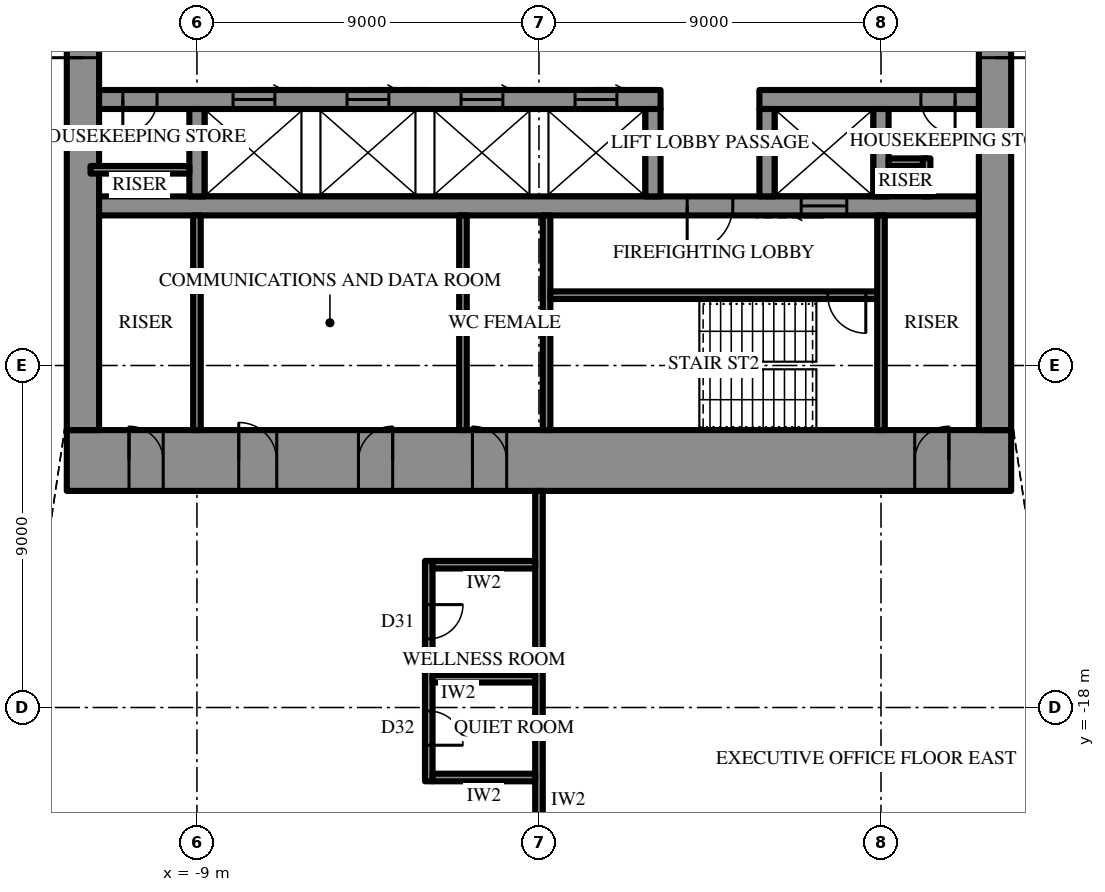
"""IFC4 building model, lengths in metres.
Left out: names, types, materials, properties, quantities, classifications, styles, units other than length and angle.
Written with IfcOpenShell. Run it as: python <this file> out.ifc"""

import sys

from ifc_helpers import new_model, si_unit, direction, frame, frame_2d, origin, place, context, subcontext, project, spatial, rectangle, extrude, element, fill, save


model = new_model("IFC4")
c1 = context("Model", 3, precision=1e-05, world=origin(), true_north=direction((0.0, 1.0)))
c2 = subcontext(c1, "Body", "Model", "MODEL_VIEW")
j1 = project(units=[si_unit("LENGTHUNIT", "METRE"), si_unit("PLANEANGLEUNIT", "RADIAN")], contexts=[c1])
p1 = place(None, origin())
s1 = spatial("IfcSite", under=j1, at=p1, CompositionType="ELEMENT")
p2 = place(p1, origin())
s2 = spatial("IfcBuilding", under=s1, at=p2, CompositionType="ELEMENT")
p3 = place(p2, frame((0.0, 0.0, 370.3)))
s3 = spatial("IfcBuildingStorey", under=s2, at=p3, CompositionType="ELEMENT", Elevation=370.3)
p4 = place(p3, frame((12.425, -11.5, 0.0), z_axis=(0.0, 0.0, 1.0), x_axis=(-1.0, 0.0, 0.0)))
e1 = element("IfcWall", 1, at=p4, inside=s3, PredefinedType="SHEAR", context=c2, shape_type="SweptSolid", body=[
    extrude(rectangle(XDim=24.85, YDim=1.6, at=frame_2d((12.425, 0.0))), origin(), (0.0, 0.0, 1.0), 4.2),
])
p5 = place(p4, frame((13.275, 0.0, 0.0)))
e2 = element("IfcOpeningElement", 2, at=p5, cuts=e1, PredefinedType="OPENING", context=c2, shape_type="SweptSolid", body=[
    extrude(rectangle(XDim=0.9, YDim=2.2, at=frame_2d((0.45, 1.1))), frame((0.0, 0.81, 0.0), z_axis=(0.0, -1.0, 0.0), x_axis=(1.0, 0.0, 0.0)), (0.0, 0.0, 1.0), 1.62),
])
p6 = place(p4, frame((16.275, 0.0, 0.0)))
e3 = element("IfcOpeningElement", 3, at=p6, cuts=e1, PredefinedType="OPENING", context=c2, shape_type="SweptSolid", body=[
    extrude(rectangle(XDim=0.9, YDim=2.2, at=frame_2d((0.45, 1.1))), frame((0.0, 0.81, 0.0), z_axis=(0.0, -1.0, 0.0), x_axis=(1.0, 0.0, 0.0)), (0.0, 0.0, 1.0), 1.62),
])
p7 = place(p4, frame((19.325, 0.0, 0.0)))
e4 = element("IfcOpeningElement", 4, at=p7, cuts=e1, PredefinedType="OPENING", context=c2, shape_type="SweptSolid", body=[
    extrude(rectangle(XDim=1.0, YDim=2.2, at=frame_2d((0.5, 1.1))), frame((0.0, 0.81, 0.0), z_axis=(0.0, -1.0, 0.0), x_axis=(1.0, 0.0, 0.0)), (0.0, 0.0, 1.0), 1.62),
])
p8 = place(p4, frame((1.637, 0.0, 0.0)))
e5 = element("IfcOpeningElement", 5, at=p8, cuts=e1, PredefinedType="OPENING", context=c2, shape_type="SweptSolid", body=[
    extrude(rectangle(XDim=0.9, YDim=2.2, at=frame_2d((0.45, 1.1))), frame((0.0, 0.81, 0.0), z_axis=(0.0, -1.0, 0.0), x_axis=(1.0, 0.0, 0.0)), (0.0, 0.0, 1.0), 1.62),
])
p9 = place(p4, frame((22.312, 0.0, 0.0)))
e6 = element("IfcOpeningElement", 6, at=p9, cuts=e1, PredefinedType="OPENING", context=c2, shape_type="SweptSolid", body=[
    extrude(rectangle(XDim=0.9, YDim=2.2, at=frame_2d((0.45, 1.1))), frame((0.0, 0.81, 0.0), z_axis=(0.0, -1.0, 0.0), x_axis=(1.0, 0.0, 0.0)), (0.0, 0.0, 1.0), 1.62),
])
p10 = place(p3, frame((12.0, -10.7, 0.0), z_axis=(0.0, 0.0, 1.0), x_axis=(0.0, 1.0, 0.0)))
e7 = element("IfcWall", 7, at=p10, inside=s3, PredefinedType="SHEAR", context=c2, shape_type="SweptSolid", body=[
    extrude(rectangle(XDim=21.4, YDim=0.85, at=frame_2d((10.7, 0.0))), origin(), (0.0, 0.0, 1.0), 4.2),
])
p11 = place(p10, frame((9.8, 0.0, 0.0)))
e8 = element("IfcOpeningElement", 8, at=p11, cuts=e7, PredefinedType="OPENING", context=c2, shape_type="SweptSolid", body=[
    extrude(rectangle(XDim=1.8, YDim=2.4, at=frame_2d((0.9, 1.2))), frame((0.0, 0.435, 0.0), z_axis=(0.0, -1.0, 0.0), x_axis=(1.0, 0.0, 0.0)), (0.0, 0.0, 1.0), 0.87),
])
p12 = place(p3, frame((-12.0, 10.7, 0.0), z_axis=(0.0, 0.0, 1.0), x_axis=(0.0, -1.0, 0.0)))
e9 = element("IfcWall", 9, at=p12, inside=s3, PredefinedType="SHEAR", context=c2, shape_type="SweptSolid", body=[
    extrude(rectangle(XDim=21.4, YDim=0.85, at=frame_2d((10.7, 0.0))), origin(), (0.0, 0.0, 1.0), 4.2),
])
p13 = place(p12, frame((9.8, 0.0, 0.0)))
e10 = element("IfcOpeningElement", 10, at=p13, cuts=e9, PredefinedType="OPENING", context=c2, shape_type="SweptSolid", body=[
    extrude(rectangle(XDim=1.8, YDim=2.4, at=frame_2d((0.9, 1.2))), frame((0.0, 0.435, 0.0), z_axis=(0.0, -1.0, 0.0), x_axis=(1.0, 0.0, 0.0)), (0.0, 0.0, 1.0), 0.87),
])
p14 = place(p3, frame((11.575, -2.0, 0.0), z_axis=(0.0, 0.0, 1.0), x_axis=(-1.0, 0.0, 0.0)))
e11 = element("IfcWall", 11, at=p14, inside=s3, PredefinedType="SHEAR", context=c2, shape_type="SweptSolid", body=[
    extrude(rectangle(XDim=5.775, YDim=0.5, at=frame_2d((2.887, 0.0))), origin(), (0.0, 0.0, 1.0), 4.2),
])
p15 = place(p14, frame((0.625, 0.0, 0.0)))
e12 = element("IfcOpeningElement", 12, at=p15, cuts=e11, PredefinedType="OPENING", context=c2, shape_type="SweptSolid", body=[
    extrude(rectangle(XDim=0.9, YDim=2.2, at=frame_2d((0.45, 1.1))), frame((0.0, 0.26, 0.0), z_axis=(0.0, -1.0, 0.0), x_axis=(1.0, 0.0, 0.0)), (0.0, 0.0, 1.0), 0.52),
])
p16 = place(p3, frame((3.2, -2.0, 0.0), z_axis=(0.0, 0.0, 1.0), x_axis=(-1.0, 0.0, 0.0)))
e13 = element("IfcWall", 13, at=p16, inside=s3, PredefinedType="SHEAR", context=c2, shape_type="SweptSolid", body=[
    extrude(rectangle(XDim=14.775, YDim=0.5, at=frame_2d((7.387, 0.0))), origin(), (0.0, 0.0, 1.0), 4.2),
])
p17 = place(p16, frame((13.25, 0.0, 0.0)))
e14 = element("IfcOpeningElement", 14, at=p17, cuts=e13, PredefinedType="OPENING", context=c2, shape_type="SweptSolid", body=[
    extrude(rectangle(XDim=0.9, YDim=2.2, at=frame_2d((0.45, 1.1))), frame((0.0, 0.26, 0.0), z_axis=(0.0, -1.0, 0.0), x_axis=(1.0, 0.0, 0.0)), (0.0, 0.0, 1.0), 0.52),
])
p18 = place(p16, frame((1.15, 0.0, 0.0)))
e15 = element("IfcOpeningElement", 15, at=p18, cuts=e13, PredefinedType="OPENING", context=c2, shape_type="SweptSolid", body=[
    extrude(rectangle(XDim=1.1, YDim=2.2, at=frame_2d((0.55, 1.1))), frame((0.0, 0.26, 0.0), z_axis=(0.0, -1.0, 0.0), x_axis=(1.0, 0.0, 0.0)), (0.0, 0.0, 1.0), 0.52),
])
p19 = place(p16, frame((4.15, 0.0, 0.0)))
e16 = element("IfcOpeningElement", 16, at=p19, cuts=e13, PredefinedType="OPENING", context=c2, shape_type="SweptSolid", body=[
    extrude(rectangle(XDim=1.1, YDim=2.2, at=frame_2d((0.55, 1.1))), frame((0.0, 0.26, 0.0), z_axis=(0.0, -1.0, 0.0), x_axis=(1.0, 0.0, 0.0)), (0.0, 0.0, 1.0), 0.52),
])
p20 = place(p16, frame((7.15, 0.0, 0.0)))
e17 = element("IfcOpeningElement", 17, at=p20, cuts=e13, PredefinedType="OPENING", context=c2, shape_type="SweptSolid", body=[
    extrude(rectangle(XDim=1.1, YDim=2.2, at=frame_2d((0.55, 1.1))), frame((0.0, 0.26, 0.0), z_axis=(0.0, -1.0, 0.0), x_axis=(1.0, 0.0, 0.0)), (0.0, 0.0, 1.0), 0.52),
])
p21 = place(p16, frame((10.15, 0.0, 0.0)))
e18 = element("IfcOpeningElement", 18, at=p21, cuts=e13, PredefinedType="OPENING", context=c2, shape_type="SweptSolid", body=[
    extrude(rectangle(XDim=1.1, YDim=2.2, at=frame_2d((0.55, 1.1))), frame((0.0, 0.26, 0.0), z_axis=(0.0, -1.0, 0.0), x_axis=(1.0, 0.0, 0.0)), (0.0, 0.0, 1.0), 0.52),
])
p22 = place(p3, frame((11.575, -4.8, 0.0), z_axis=(0.0, 0.0, 1.0), x_axis=(-1.0, 0.0, 0.0)))
e19 = element("IfcWall", 19, at=p22, inside=s3, PredefinedType="SHEAR", context=c2, shape_type="SweptSolid", body=[
    extrude(rectangle(XDim=23.15, YDim=0.5, at=frame_2d((11.575, 0.0))), origin(), (0.0, 0.0, 1.0), 4.2),
])
p23 = place(p22, frame((6.475, 0.0, 0.0)))
e20 = element("IfcOpeningElement", 20, at=p23, cuts=e19, PredefinedType="OPENING", context=c2, shape_type="SweptSolid", body=[
    extrude(rectangle(XDim=1.2, YDim=2.2, at=frame_2d((0.6, 1.1))), frame((0.0, 0.26, 0.0), z_axis=(0.0, -1.0, 0.0), x_axis=(1.0, 0.0, 0.0)), (0.0, 0.0, 1.0), 0.52),
])
p24 = place(p22, frame((3.475, 0.0, 0.0)))
e21 = element("IfcOpeningElement", 21, at=p24, cuts=e19, PredefinedType="OPENING", context=c2, shape_type="SweptSolid", body=[
    extrude(rectangle(XDim=1.2, YDim=2.2, at=frame_2d((0.6, 1.1))), frame((0.0, 0.26, 0.0), z_axis=(0.0, -1.0, 0.0), x_axis=(1.0, 0.0, 0.0)), (0.0, 0.0, 1.0), 0.52),
])
for number, where, z_axis, x_axis in (
    (22, (9.0, -2.25, 0.0), (0.0, 0.0, 1.0), (0.0, -1.0, 0.0)),
    (23, (6.0, -2.25, 0.0), (0.0, 0.0, 1.0), (0.0, -1.0, 0.0)),
    (24, (3.0, -2.25, 0.0), (0.0, 0.0, 1.0), (0.0, -1.0, 0.0)),
    (25, (-9.0, -2.25, 0.0), (0.0, 0.0, 1.0), (0.0, -1.0, 0.0)),
):
    element("IfcWall", number, at=place(p3, frame(where, z_axis=z_axis, x_axis=x_axis)), inside=s3, PredefinedType="SHEAR", context=c2, shape_type="SweptSolid", body=[
        extrude(rectangle(XDim=2.3, YDim=0.4, at=frame_2d((1.15, 0.0))), origin(), (0.0, 0.0, 1.0), 4.2),
    ])
p25 = place(p3, frame((0.2, -5.05, 0.0), z_axis=(0.0, 0.0, 1.0), x_axis=(0.0, -1.0, 0.0)))
e26 = element("IfcWall", 26, at=p25, inside=s3, PredefinedType="SHEAR", context=c2, shape_type="SweptSolid", body=[
    extrude(rectangle(XDim=5.65, YDim=0.2, at=frame_2d((2.825, 0.0))), origin(), (0.0, 0.0, 1.0), 4.2),
])
p26 = place(p3, frame((8.9, -7.15, 0.0), z_axis=(0.0, 0.0, 1.0), x_axis=(-1.0, 0.0, 0.0)))
e27 = element("IfcWall", 27, at=p26, inside=s3, PredefinedType="SHEAR", context=c2, shape_type="SweptSolid", body=[
    extrude(rectangle(XDim=8.6, YDim=0.2, at=frame_2d((4.3, 0.0))), origin(), (0.0, 0.0, 1.0), 4.2),
])
p27 = place(p26, frame((0.3, 0.0, 0.0)))
e28 = element("IfcOpeningElement", 28, at=p27, cuts=e27, PredefinedType="OPENING", context=c2, shape_type="SweptSolid", body=[
    extrude(rectangle(XDim=1.0, YDim=2.2, at=frame_2d((0.5, 1.1))), frame((0.0, 0.11, 0.0), z_axis=(0.0, -1.0, 0.0), x_axis=(1.0, 0.0, 0.0)), (0.0, 0.0, 1.0), 0.22),
])
for number, where, z_axis, x_axis in (
    (29, (9.0, -5.05, 0.0), (0.0, 0.0, 1.0), (0.0, -1.0, 0.0)),
    (30, (-9.0, -5.05, 0.0), (0.0, 0.0, 1.0), (0.0, -1.0, 0.0)),
    (31, (-2.0, -5.05, 0.0), (0.0, 0.0, 1.0), (0.0, -1.0, 0.0)),
):
    element("IfcWall", number, at=place(p3, frame(where, z_axis=z_axis, x_axis=x_axis)), inside=s3, PredefinedType="PARTITIONING", context=c2, shape_type="SweptSolid", body=[
        extrude(rectangle(XDim=5.65, YDim=0.2, at=frame_2d((2.825, 0.0))), origin(), (0.0, 0.0, 1.0), 4.0),
    ])
for number, where, z_axis, x_axis in (
    (32, (10.2, -3.65, 0.0), (0.0, 0.0, 1.0), (-1.0, 0.0, 0.0)),
    (33, (10.2, -3.55, 0.0), (0.0, 0.0, 1.0), (0.0, -1.0, 0.0)),
):
    element("IfcWall", number, at=place(p3, frame(where, z_axis=z_axis, x_axis=x_axis)), inside=s3, PredefinedType="PARTITIONING", context=c2, shape_type="SweptSolid", body=[
        extrude(rectangle(XDim=1.0, YDim=0.2, at=frame_2d((0.5, 0.0))), origin(), (0.0, 0.0, 1.0), 4.0),
    ])
p28 = place(p3, frame((-9.2, -3.85, 0.0), z_axis=(0.0, 0.0, 1.0), x_axis=(-1.0, 0.0, 0.0)))
e34 = element("IfcWall", 34, at=p28, inside=s3, PredefinedType="PARTITIONING", context=c2, shape_type="SweptSolid", body=[
    extrude(rectangle(XDim=2.6, YDim=0.2, at=frame_2d((1.3, 0.0))), origin(), (0.0, 0.0, 1.0), 4.0),
])
p29 = place(p3, frame((0.0, -12.3, 0.0), z_axis=(0.0, 0.0, 1.0), x_axis=(0.0, -1.0, 0.0)))
e35 = element("IfcWall", 35, at=p29, inside=s3, PredefinedType="PARTITIONING", context=c2, shape_type="SweptSolid", body=[
    extrude(rectangle(XDim=13.55, YDim=0.2, at=frame_2d((6.775, 0.0))), origin(), (0.0, 0.0, 1.0), 2.992),
])
p30 = place(p3, frame((-2.9, -14.143, 0.0), z_axis=(0.0, 0.0, 1.0), x_axis=(0.0, -1.0, 0.0)))
e36 = element("IfcWall", 36, at=p30, inside=s3, PredefinedType="PARTITIONING", context=c2, shape_type="SweptSolid", body=[
    extrude(rectangle(XDim=5.8, YDim=0.2, at=frame_2d((2.9, 0.0))), origin(), (0.0, 0.0, 1.0), 4.0),
])
p31 = place(p30, frame((1.15, 0.0, 0.0)))
e37 = element("IfcOpeningElement", 37, at=p31, cuts=e36, PredefinedType="OPENING", context=c2, shape_type="SweptSolid", body=[
    extrude(rectangle(XDim=0.9, YDim=2.2, at=frame_2d((0.45, 1.1))), frame((0.0, 0.11, 0.0), z_axis=(0.0, -1.0, 0.0), x_axis=(1.0, 0.0, 0.0)), (0.0, 0.0, 1.0), 0.22),
])
p32 = place(p30, frame((3.95, 0.0, 0.0)))
e38 = element("IfcOpeningElement", 38, at=p32, cuts=e36, PredefinedType="OPENING", context=c2, shape_type="SweptSolid", body=[
    extrude(rectangle(XDim=0.9, YDim=2.2, at=frame_2d((0.45, 1.1))), frame((0.0, 0.11, 0.0), z_axis=(0.0, -1.0, 0.0), x_axis=(1.0, 0.0, 0.0)), (0.0, 0.0, 1.0), 0.22),
])
for number, where, z_axis, x_axis in (
    (39, (-0.1, -14.242, 0.0), (0.0, 0.0, 1.0), (-1.0, 0.0, 0.0)),
    (40, (-0.1, -17.242, 0.0), (0.0, 0.0, 1.0), (-1.0, 0.0, 0.0)),
    (41, (-0.1, -19.843, 0.0), (0.0, 0.0, 1.0), (-1.0, 0.0, 0.0)),
):
    element("IfcWall", number, at=place(p3, frame(where, z_axis=z_axis, x_axis=x_axis)), inside=s3, PredefinedType="PARTITIONING", context=c2, shape_type="SweptSolid", body=[
        extrude(rectangle(XDim=2.7, YDim=0.2, at=frame_2d((1.35, 0.0))), origin(), (0.0, 0.0, 1.0), 4.0),
    ])
p33 = place(p11, frame((1.8, 0.0, 0.0), z_axis=(0.0, 0.0, 1.0), x_axis=(-1.0, 0.0, 0.0)))
e42 = element("IfcDoor", 42, at=p33, inside=s3, OperationType="DOUBLE_DOOR_SINGLE_SWING", PredefinedType="DOOR", context=c2, shape_type="SweptSolid", body=[
    extrude(rectangle(XDim=1.8, YDim=2.4, at=frame_2d((0.9, 1.2))), frame((0.0, 0.025, 0.0), z_axis=(0.0, -1.0, 0.0), x_axis=(1.0, 0.0, 0.0)), (0.0, 0.0, 1.0), 0.05),
])
fill(e8, e42)
p34 = place(p13, frame((1.8, 0.0, 0.0), z_axis=(0.0, 0.0, 1.0), x_axis=(-1.0, 0.0, 0.0)))
e43 = element("IfcDoor", 43, at=p34, inside=s3, OperationType="DOUBLE_DOOR_SINGLE_SWING", PredefinedType="DOOR", context=c2, shape_type="SweptSolid", body=[
    extrude(rectangle(XDim=1.8, YDim=2.4, at=frame_2d((0.9, 1.2))), frame((0.0, 0.025, 0.0), z_axis=(0.0, -1.0, 0.0), x_axis=(1.0, 0.0, 0.0)), (0.0, 0.0, 1.0), 0.05),
])
fill(e10, e43)
p35 = place(p23, origin())
e44 = element("IfcDoor", 44, at=p35, inside=s3, OperationType="SINGLE_SWING_LEFT", PredefinedType="DOOR", context=c2, shape_type="SweptSolid", body=[
    extrude(rectangle(XDim=1.2, YDim=2.2, at=frame_2d((0.6, 1.1))), frame((0.0, 0.025, 0.0), z_axis=(0.0, -1.0, 0.0), x_axis=(1.0, 0.0, 0.0)), (0.0, 0.0, 1.0), 0.05),
])
fill(e20, e44)
p36 = place(p27, origin())
e45 = element("IfcDoor", 45, at=p36, inside=s3, OperationType="SINGLE_SWING_RIGHT", PredefinedType="DOOR", context=c2, shape_type="SweptSolid", body=[
    extrude(rectangle(XDim=1.0, YDim=2.2, at=frame_2d((0.5, 1.1))), frame((0.0, 0.025, 0.0), z_axis=(0.0, -1.0, 0.0), x_axis=(1.0, 0.0, 0.0)), (0.0, 0.0, 1.0), 0.05),
])
fill(e28, e45)
p37 = place(p5, frame((0.9, 0.0, 0.0), z_axis=(0.0, 0.0, 1.0), x_axis=(-1.0, 0.0, 0.0)))
e46 = element("IfcDoor", 46, at=p37, inside=s3, OperationType="SINGLE_SWING_RIGHT", PredefinedType="DOOR", context=c2, shape_type="SweptSolid", body=[
    extrude(rectangle(XDim=0.9, YDim=2.2, at=frame_2d((0.45, 1.1))), frame((0.0, 0.025, 0.0), z_axis=(0.0, -1.0, 0.0), x_axis=(1.0, 0.0, 0.0)), (0.0, 0.0, 1.0), 0.05),
])
fill(e2, e46)
p38 = place(p6, frame((0.9, 0.0, 0.0), z_axis=(0.0, 0.0, 1.0), x_axis=(-1.0, 0.0, 0.0)))
e47 = element("IfcDoor", 47, at=p38, inside=s3, OperationType="SINGLE_SWING_LEFT", PredefinedType="DOOR", context=c2, shape_type="SweptSolid", body=[
    extrude(rectangle(XDim=0.9, YDim=2.2, at=frame_2d((0.45, 1.1))), frame((0.0, 0.025, 0.0), z_axis=(0.0, -1.0, 0.0), x_axis=(1.0, 0.0, 0.0)), (0.0, 0.0, 1.0), 0.05),
])
fill(e3, e47)
p39 = place(p7, frame((1.0, 0.0, 0.0), z_axis=(0.0, 0.0, 1.0), x_axis=(-1.0, 0.0, 0.0)))
e48 = element("IfcDoor", 48, at=p39, inside=s3, OperationType="SINGLE_SWING_RIGHT", PredefinedType="DOOR", context=c2, shape_type="SweptSolid", body=[
    extrude(rectangle(XDim=1.0, YDim=2.2, at=frame_2d((0.5, 1.1))), frame((0.0, 0.025, 0.0), z_axis=(0.0, -1.0, 0.0), x_axis=(1.0, 0.0, 0.0)), (0.0, 0.0, 1.0), 0.05),
])
fill(e4, e48)
p40 = place(p8, frame((0.9, 0.0, 0.0), z_axis=(0.0, 0.0, 1.0), x_axis=(-1.0, 0.0, 0.0)))
e49 = element("IfcDoor", 49, at=p40, inside=s3, OperationType="SINGLE_SWING_LEFT", PredefinedType="DOOR", context=c2, shape_type="SweptSolid", body=[
    extrude(rectangle(XDim=0.9, YDim=2.2, at=frame_2d((0.45, 1.1))), frame((0.0, 0.025, 0.0), z_axis=(0.0, -1.0, 0.0), x_axis=(1.0, 0.0, 0.0)), (0.0, 0.0, 1.0), 0.05),
])
fill(e5, e49)
p41 = place(p9, frame((0.9, 0.0, 0.0), z_axis=(0.0, 0.0, 1.0), x_axis=(-1.0, 0.0, 0.0)))
e50 = element("IfcDoor", 50, at=p41, inside=s3, OperationType="SINGLE_SWING_RIGHT", PredefinedType="DOOR", context=c2, shape_type="SweptSolid", body=[
    extrude(rectangle(XDim=0.9, YDim=2.2, at=frame_2d((0.45, 1.1))), frame((0.0, 0.025, 0.0), z_axis=(0.0, -1.0, 0.0), x_axis=(1.0, 0.0, 0.0)), (0.0, 0.0, 1.0), 0.05),
])
fill(e6, e50)
p42 = place(p15, origin())
e51 = element("IfcDoor", 51, at=p42, inside=s3, OperationType="SINGLE_SWING_RIGHT", PredefinedType="DOOR", context=c2, shape_type="SweptSolid", body=[
    extrude(rectangle(XDim=0.9, YDim=2.2, at=frame_2d((0.45, 1.1))), frame((0.0, 0.025, 0.0), z_axis=(0.0, -1.0, 0.0), x_axis=(1.0, 0.0, 0.0)), (0.0, 0.0, 1.0), 0.05),
])
fill(e12, e51)
p43 = place(p17, origin())
e52 = element("IfcDoor", 52, at=p43, inside=s3, OperationType="SINGLE_SWING_LEFT", PredefinedType="DOOR", context=c2, shape_type="SweptSolid", body=[
    extrude(rectangle(XDim=0.9, YDim=2.2, at=frame_2d((0.45, 1.1))), frame((0.0, 0.025, 0.0), z_axis=(0.0, -1.0, 0.0), x_axis=(1.0, 0.0, 0.0)), (0.0, 0.0, 1.0), 0.05),
])
fill(e14, e52)
p44 = place(p24, origin())
e53 = element("IfcDoor", 53, at=p44, inside=s3, OperationType="SLIDING_TO_LEFT", PredefinedType="DOOR", context=c2, shape_type="SweptSolid", body=[
    extrude(rectangle(XDim=1.2, YDim=2.2, at=frame_2d((0.6, 1.1))), frame((0.0, 0.025, 0.0), z_axis=(0.0, -1.0, 0.0), x_axis=(1.0, 0.0, 0.0)), (0.0, 0.0, 1.0), 0.05),
])
fill(e21, e53)
p45 = place(p18, frame((1.1, 0.0, 0.0), z_axis=(0.0, 0.0, 1.0), x_axis=(-1.0, 0.0, 0.0)))
e54 = element("IfcDoor", 54, at=p45, inside=s3, OperationType="SLIDING_TO_LEFT", PredefinedType="DOOR", context=c2, shape_type="SweptSolid", body=[
    extrude(rectangle(XDim=1.1, YDim=2.2, at=frame_2d((0.55, 1.1))), frame((0.0, 0.025, 0.0), z_axis=(0.0, -1.0, 0.0), x_axis=(1.0, 0.0, 0.0)), (0.0, 0.0, 1.0), 0.05),
])
fill(e15, e54)
p46 = place(p19, frame((1.1, 0.0, 0.0), z_axis=(0.0, 0.0, 1.0), x_axis=(-1.0, 0.0, 0.0)))
e55 = element("IfcDoor", 55, at=p46, inside=s3, OperationType="SLIDING_TO_LEFT", PredefinedType="DOOR", context=c2, shape_type="SweptSolid", body=[
    extrude(rectangle(XDim=1.1, YDim=2.2, at=frame_2d((0.55, 1.1))), frame((0.0, 0.025, 0.0), z_axis=(0.0, -1.0, 0.0), x_axis=(1.0, 0.0, 0.0)), (0.0, 0.0, 1.0), 0.05),
])
fill(e16, e55)
p47 = place(p20, frame((1.1, 0.0, 0.0), z_axis=(0.0, 0.0, 1.0), x_axis=(-1.0, 0.0, 0.0)))
e56 = element("IfcDoor", 56, at=p47, inside=s3, OperationType="SLIDING_TO_LEFT", PredefinedType="DOOR", context=c2, shape_type="SweptSolid", body=[
    extrude(rectangle(XDim=1.1, YDim=2.2, at=frame_2d((0.55, 1.1))), frame((0.0, 0.025, 0.0), z_axis=(0.0, -1.0, 0.0), x_axis=(1.0, 0.0, 0.0)), (0.0, 0.0, 1.0), 0.05),
])
fill(e17, e56)
p48 = place(p21, frame((1.1, 0.0, 0.0), z_axis=(0.0, 0.0, 1.0), x_axis=(-1.0, 0.0, 0.0)))
e57 = element("IfcDoor", 57, at=p48, inside=s3, OperationType="SLIDING_TO_LEFT", PredefinedType="DOOR", context=c2, shape_type="SweptSolid", body=[
    extrude(rectangle(XDim=1.1, YDim=2.2, at=frame_2d((0.55, 1.1))), frame((0.0, 0.025, 0.0), z_axis=(0.0, -1.0, 0.0), x_axis=(1.0, 0.0, 0.0)), (0.0, 0.0, 1.0), 0.05),
])
fill(e18, e57)
p49 = place(p31, origin())
e58 = element("IfcDoor", 58, at=p49, inside=s3, OperationType="SINGLE_SWING_RIGHT", PredefinedType="DOOR", context=c2, shape_type="SweptSolid", body=[
    extrude(rectangle(XDim=0.9, YDim=2.2, at=frame_2d((0.45, 1.1))), frame((0.0, 0.025, 0.0), z_axis=(0.0, -1.0, 0.0), x_axis=(1.0, 0.0, 0.0)), (0.0, 0.0, 1.0), 0.05),
])
fill(e37, e58)
p50 = place(p32, origin())
e59 = element("IfcDoor", 59, at=p50, inside=s3, OperationType="SINGLE_SWING_LEFT", PredefinedType="DOOR", context=c2, shape_type="SweptSolid", body=[
    extrude(rectangle(XDim=0.9, YDim=2.2, at=frame_2d((0.45, 1.1))), frame((0.0, 0.025, 0.0), z_axis=(0.0, -1.0, 0.0), x_axis=(1.0, 0.0, 0.0)), (0.0, 0.0, 1.0), 0.05),
])
fill(e38, e59)
save(model, sys.argv[1])
